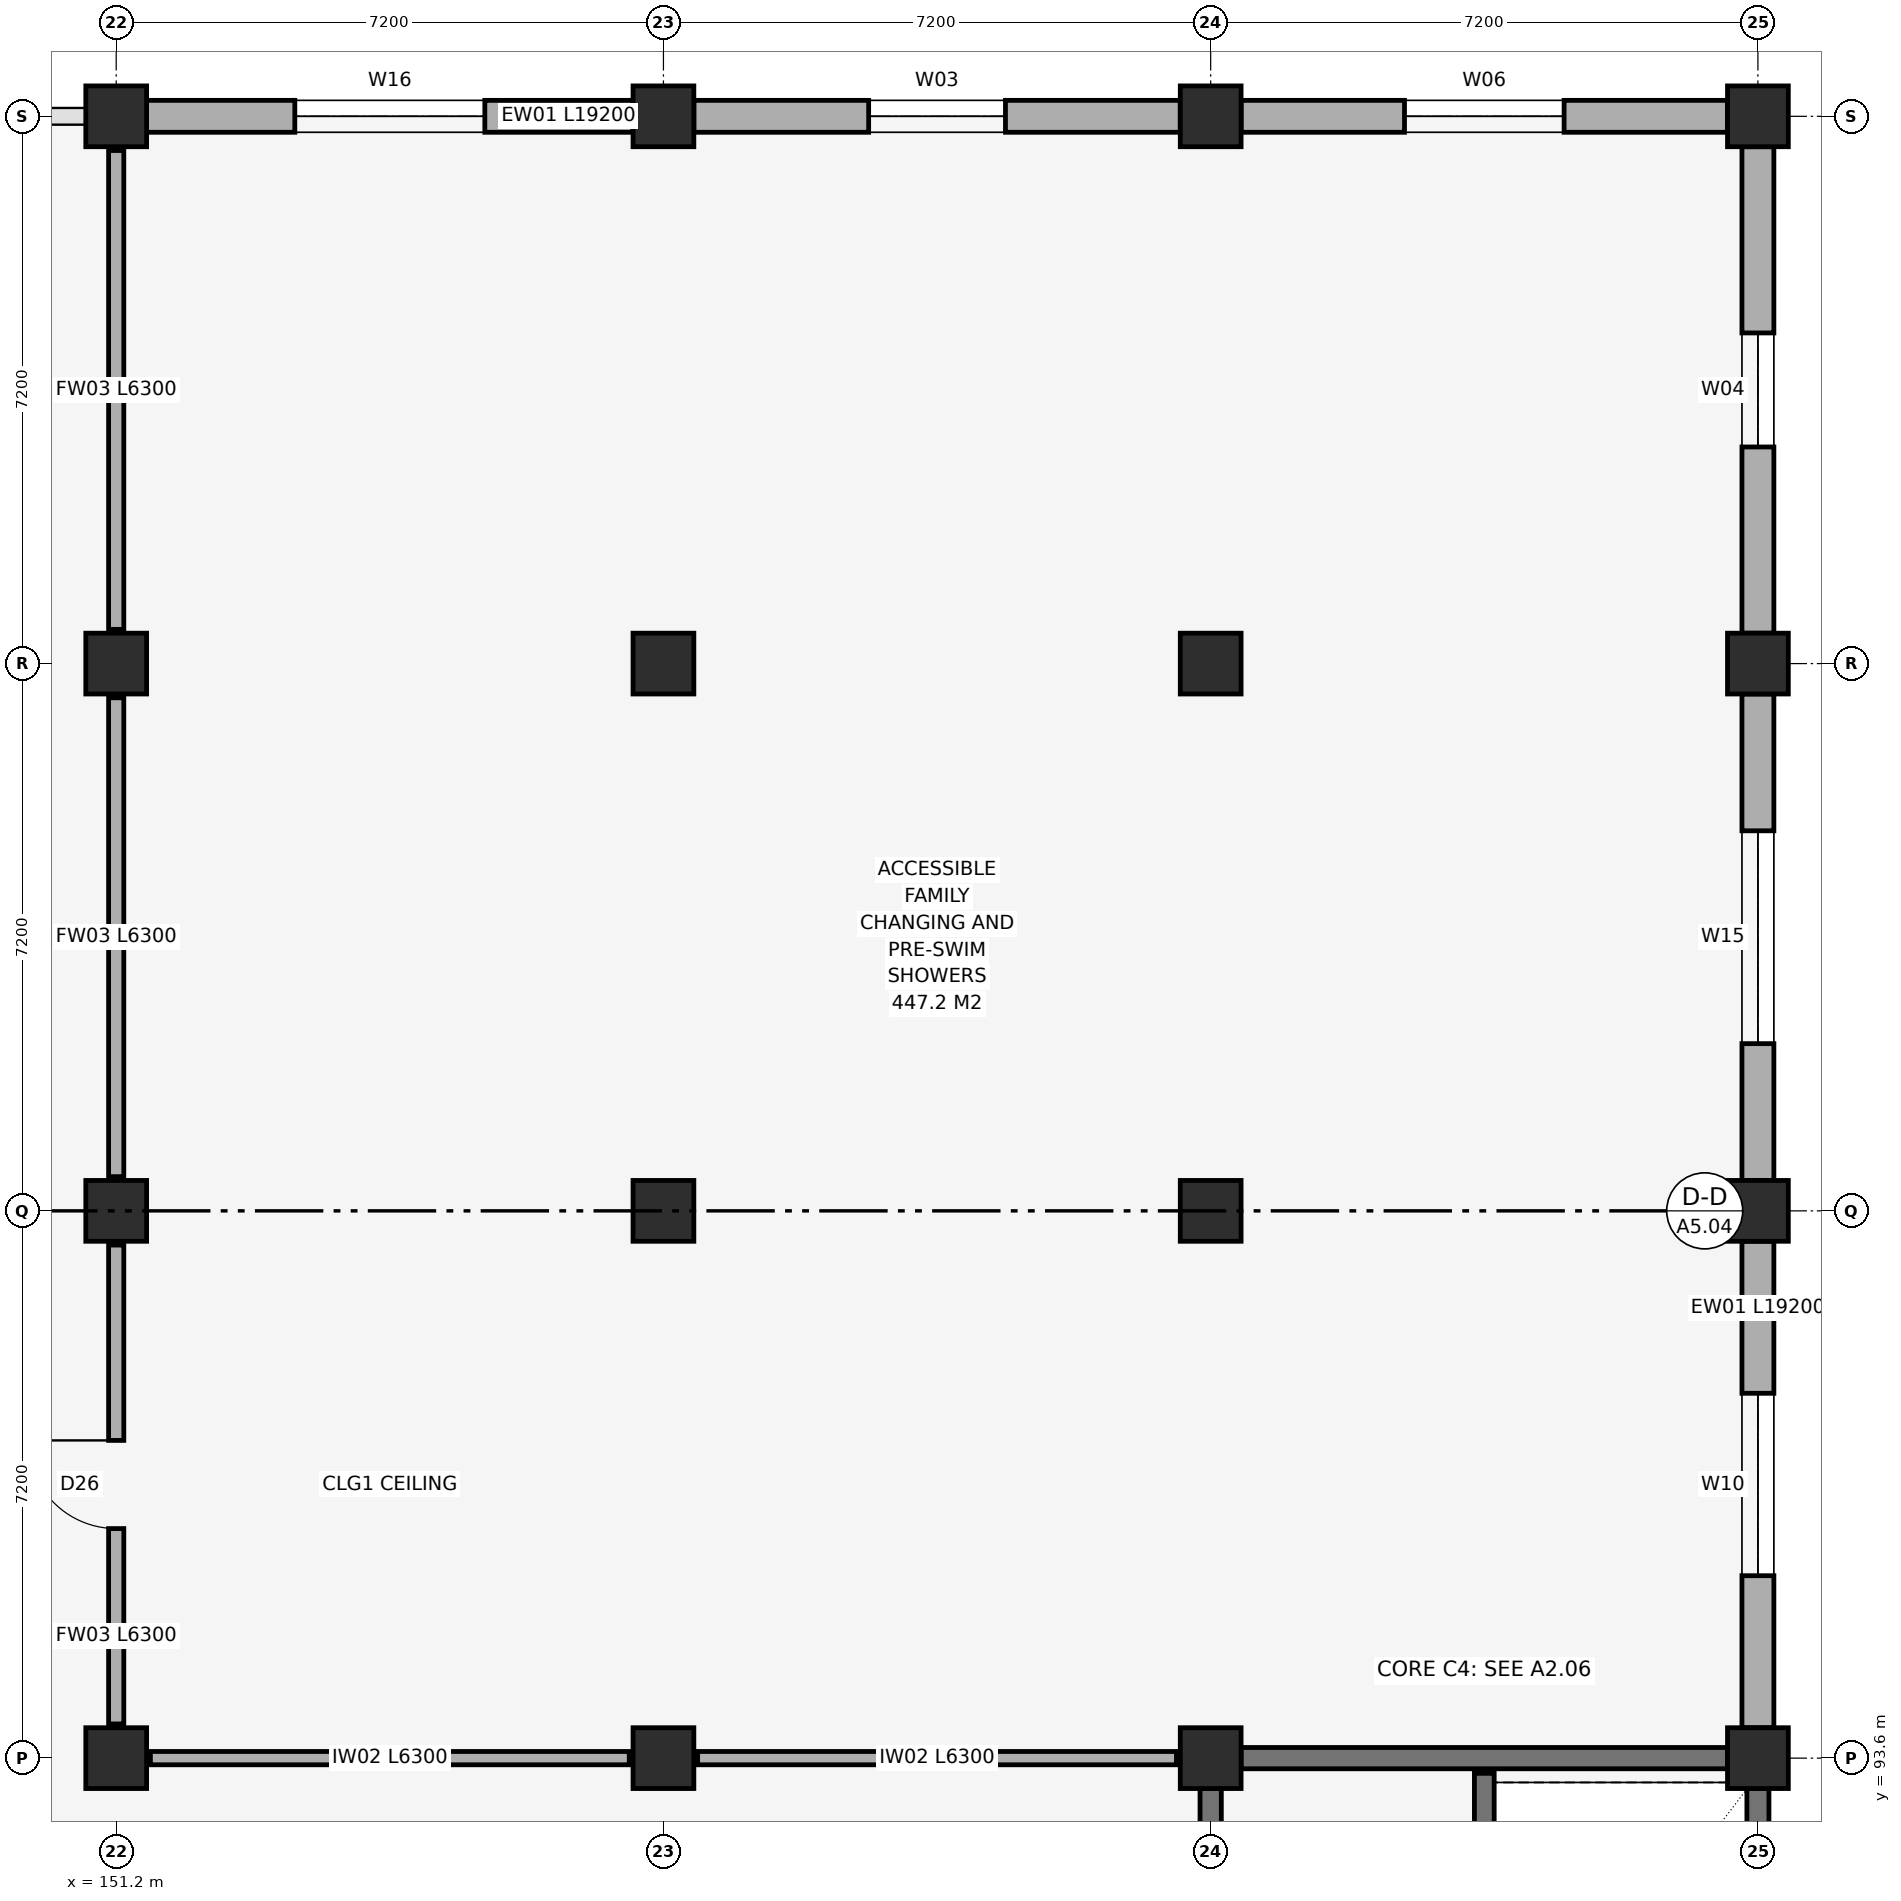
"""IFC4 building model, lengths in metres.
Left out: names, types, materials, properties, quantities, classifications, styles, units other than length and angle.
Written with IfcOpenShell. Run it as: python <this file> out.ifc"""

import sys

from ifc_helpers import new_model, si_unit, direction, frame, frame_2d, origin, origin_2d, place, context, subcontext, project, spatial, rectangle, extrude, element, fill, save


model = new_model("IFC4")
c1 = context("Model", 3, precision=1e-05, world=origin(), true_north=direction((0.0, 1.0)))
c2 = subcontext(c1, "Body", "Model", "MODEL_VIEW")
j1 = project(units=[si_unit("LENGTHUNIT", "METRE"), si_unit("PLANEANGLEUNIT", "RADIAN")], contexts=[c1])
p1 = place(None, origin())
s1 = spatial("IfcSite", under=j1, at=p1, CompositionType="ELEMENT")
p2 = place(p1, origin())
s2 = spatial("IfcBuilding", under=s1, at=p2, CompositionType="ELEMENT")
p3 = place(p2, origin())
s3 = spatial("IfcBuildingStorey", under=s2, at=p3, CompositionType="ELEMENT", Elevation=0.0)
for number, where, z_axis, x_axis in (
    (1, (151.2, 93.6, 0.0), (0.0, 0.0, 1.0), (1.0, 0.0, 0.0)),
    (2, (151.2, 100.8, 0.0), (0.0, 0.0, 1.0), (1.0, 0.0, 0.0)),
    (3, (151.2, 108.0, 0.0), (0.0, 0.0, 1.0), (1.0, 0.0, 0.0)),
    (4, (151.2, 115.2, 0.0), (0.0, 0.0, 1.0), (1.0, 0.0, 0.0)),
    (5, (158.4, 93.6, 0.0), (0.0, 0.0, 1.0), (1.0, 0.0, 0.0)),
    (6, (158.4, 100.8, 0.0), (0.0, 0.0, 1.0), (1.0, 0.0, 0.0)),
    (7, (158.4, 108.0, 0.0), (0.0, 0.0, 1.0), (1.0, 0.0, 0.0)),
    (8, (158.4, 115.2, 0.0), (0.0, 0.0, 1.0), (1.0, 0.0, 0.0)),
    (9, (165.6, 93.6, 0.0), (0.0, 0.0, 1.0), (1.0, 0.0, 0.0)),
    (10, (165.6, 100.8, 0.0), (0.0, 0.0, 1.0), (1.0, 0.0, 0.0)),
    (11, (165.6, 108.0, 0.0), (0.0, 0.0, 1.0), (1.0, 0.0, 0.0)),
    (12, (165.6, 115.2, 0.0), (0.0, 0.0, 1.0), (1.0, 0.0, 0.0)),
    (13, (172.8, 93.6, 0.0), (0.0, 0.0, 1.0), (1.0, 0.0, 0.0)),
    (14, (172.8, 100.8, 0.0), (0.0, 0.0, 1.0), (1.0, 0.0, 0.0)),
    (15, (172.8, 108.0, 0.0), (0.0, 0.0, 1.0), (1.0, 0.0, 0.0)),
    (16, (172.8, 115.2, 0.0), (0.0, 0.0, 1.0), (1.0, 0.0, 0.0)),
):
    element("IfcColumn", number, at=place(p3, frame(where, z_axis=z_axis, x_axis=x_axis)), inside=s3, PredefinedType="COLUMN", context=c2, shape_type="SweptSolid", body=[
        extrude(rectangle(XDim=0.8, YDim=0.8, at=origin_2d()), origin(), (0.0, 0.0, 1.0), 5.4),
    ])
p4 = place(p3, frame((151.6, 115.2, 0.0), z_axis=(0.0, 0.0, 1.0), x_axis=(1.0, 0.0, 0.0)))
e17 = element("IfcWall", 17, at=p4, inside=s3, PredefinedType="SOLIDWALL", context=c2, shape_type="SweptSolid", body=[
    extrude(rectangle(XDim=6.4, YDim=0.42, at=frame_2d((3.2, 0.0))), origin(), (0.0, 0.0, 1.0), 4.495),
])
p5 = place(p4, frame((1.95, 0.0, 0.95)))
e18 = element("IfcOpeningElement", 18, at=p5, cuts=e17, PredefinedType="OPENING", context=c2, shape_type="SweptSolid", body=[
    extrude(rectangle(XDim=2.5, YDim=1.35, at=frame_2d((1.25, 0.675))), frame((0.0, 0.225, 0.0), z_axis=(0.0, -1.0, 0.0), x_axis=(1.0, 0.0, 0.0)), (0.0, 0.0, 1.0), 0.45),
])
p6 = place(p3, frame((158.8, 115.2, 0.0), z_axis=(0.0, 0.0, 1.0), x_axis=(1.0, 0.0, 0.0)))
e19 = element("IfcWall", 19, at=p6, inside=s3, PredefinedType="SOLIDWALL", context=c2, shape_type="SweptSolid", body=[
    extrude(rectangle(XDim=6.4, YDim=0.42, at=frame_2d((3.2, 0.0))), origin(), (0.0, 0.0, 1.0), 4.495),
])
p7 = place(p6, frame((2.3, 0.0, 0.95)))
e20 = element("IfcOpeningElement", 20, at=p7, cuts=e19, PredefinedType="OPENING", context=c2, shape_type="SweptSolid", body=[
    extrude(rectangle(XDim=1.8, YDim=2.2, at=frame_2d((0.9, 1.1))), frame((0.0, 0.225, 0.0), z_axis=(0.0, -1.0, 0.0), x_axis=(1.0, 0.0, 0.0)), (0.0, 0.0, 1.0), 0.45),
])
p8 = place(p3, frame((166.0, 115.2, 0.0), z_axis=(0.0, 0.0, 1.0), x_axis=(1.0, 0.0, 0.0)))
e21 = element("IfcWall", 21, at=p8, inside=s3, PredefinedType="SOLIDWALL", context=c2, shape_type="SweptSolid", body=[
    extrude(rectangle(XDim=6.4, YDim=0.42, at=frame_2d((3.2, 0.0))), origin(), (0.0, 0.0, 1.0), 4.495),
])
p9 = place(p8, frame((2.15, 0.0, 0.95)))
e22 = element("IfcOpeningElement", 22, at=p9, cuts=e21, PredefinedType="OPENING", context=c2, shape_type="SweptSolid", body=[
    extrude(rectangle(XDim=2.1, YDim=2.0, at=frame_2d((1.05, 1.0))), frame((0.0, 0.225, 0.0), z_axis=(0.0, -1.0, 0.0), x_axis=(1.0, 0.0, 0.0)), (0.0, 0.0, 1.0), 0.45),
])
p10 = place(p3, frame((172.8, 94.0, 0.0), z_axis=(0.0, 0.0, 1.0), x_axis=(0.0, 1.0, 0.0)))
e23 = element("IfcWall", 23, at=p10, inside=s3, PredefinedType="SOLIDWALL", context=c2, shape_type="SweptSolid", body=[
    extrude(rectangle(XDim=6.4, YDim=0.42, at=frame_2d((3.2, 0.0))), origin(), (0.0, 0.0, 1.0), 4.495),
])
p11 = place(p10, frame((2.0, 0.0, 0.95)))
e24 = element("IfcOpeningElement", 24, at=p11, cuts=e23, PredefinedType="OPENING", context=c2, shape_type="SweptSolid", body=[
    extrude(rectangle(XDim=2.4, YDim=1.75, at=frame_2d((1.2, 0.875))), frame((0.0, 0.225, 0.0), z_axis=(0.0, -1.0, 0.0), x_axis=(1.0, 0.0, 0.0)), (0.0, 0.0, 1.0), 0.45),
])
p12 = place(p3, frame((172.8, 101.2, 0.0), z_axis=(0.0, 0.0, 1.0), x_axis=(0.0, 1.0, 0.0)))
e25 = element("IfcWall", 25, at=p12, inside=s3, PredefinedType="SOLIDWALL", context=c2, shape_type="SweptSolid", body=[
    extrude(rectangle(XDim=6.4, YDim=0.42, at=frame_2d((3.2, 0.0))), origin(), (0.0, 0.0, 1.0), 4.495),
])
p13 = place(p12, frame((1.8, 0.0, 0.95)))
e26 = element("IfcOpeningElement", 26, at=p13, cuts=e25, PredefinedType="OPENING", context=c2, shape_type="SweptSolid", body=[
    extrude(rectangle(XDim=2.8, YDim=1.5, at=frame_2d((1.4, 0.75))), frame((0.0, 0.225, 0.0), z_axis=(0.0, -1.0, 0.0), x_axis=(1.0, 0.0, 0.0)), (0.0, 0.0, 1.0), 0.45),
])
p14 = place(p3, frame((172.8, 108.4, 0.0), z_axis=(0.0, 0.0, 1.0), x_axis=(0.0, 1.0, 0.0)))
e27 = element("IfcWall", 27, at=p14, inside=s3, PredefinedType="SOLIDWALL", context=c2, shape_type="SweptSolid", body=[
    extrude(rectangle(XDim=6.4, YDim=0.42, at=frame_2d((3.2, 0.0))), origin(), (0.0, 0.0, 1.0), 4.495),
])
p15 = place(p14, frame((2.45, 0.0, 0.95)))
e28 = element("IfcOpeningElement", 28, at=p15, cuts=e27, PredefinedType="OPENING", context=c2, shape_type="SweptSolid", body=[
    extrude(rectangle(XDim=1.5, YDim=2.2, at=frame_2d((0.75, 1.1))), frame((0.0, 0.225, 0.0), z_axis=(0.0, -1.0, 0.0), x_axis=(1.0, 0.0, 0.0)), (0.0, 0.0, 1.0), 0.45),
])
p16 = place(p3, frame((166.0, 93.6, 0.0), z_axis=(0.0, 0.0, 1.0), x_axis=(1.0, 0.0, 0.0)))
e29 = element("IfcWall", 29, at=p16, inside=s3, PredefinedType="SHEAR", context=c2, shape_type="SweptSolid", body=[
    extrude(rectangle(XDim=6.4, YDim=0.28, at=frame_2d((3.2, 0.0))), origin(), (0.0, 0.0, 1.0), 5.14),
])
p17 = place(p3, frame((165.6, 86.8, 0.0), z_axis=(0.0, 0.0, 1.0), x_axis=(0.0, 1.0, 0.0)))
e30 = element("IfcWall", 30, at=p17, inside=s3, PredefinedType="SHEAR", context=c2, shape_type="SweptSolid", body=[
    extrude(rectangle(XDim=6.4, YDim=0.28, at=frame_2d((3.2, 0.0))), origin(), (0.0, 0.0, 1.0), 5.14),
])
p18 = place(p17, frame((2.4, 0.0, 0.0)))
e31 = element("IfcOpeningElement", 31, at=p18, cuts=e30, PredefinedType="OPENING", context=c2, shape_type="SweptSolid", body=[
    extrude(rectangle(XDim=1.6, YDim=2.2, at=frame_2d((0.8, 1.1))), frame((0.0, 0.155, 0.0), z_axis=(0.0, -1.0, 0.0), x_axis=(1.0, 0.0, 0.0)), (0.0, 0.0, 1.0), 0.31),
])
p19 = place(p3, frame((172.8, 86.8, 0.0), z_axis=(0.0, 0.0, 1.0), x_axis=(0.0, 1.0, 0.0)))
e32 = element("IfcWall", 32, at=p19, inside=s3, PredefinedType="SHEAR", context=c2, shape_type="SweptSolid", body=[
    extrude(rectangle(XDim=6.4, YDim=0.29, at=frame_2d((3.2, 0.0))), origin(), (0.0, 0.0, 1.0), 5.14),
])
p20 = place(p3, frame((169.2, 79.4, 0.0), z_axis=(0.0, 0.0, 1.0), x_axis=(0.0, 1.0, 0.0)))
e33 = element("IfcWall", 33, at=p20, inside=s3, PredefinedType="SHEAR", context=c2, shape_type="SweptSolid", body=[
    extrude(rectangle(XDim=14.0, YDim=0.26, at=frame_2d((7.0, 0.0))), origin(), (0.0, 0.0, 1.0), 5.14),
])
p21 = place(p20, frame((1.65, 0.0, 0.0)))
e34 = element("IfcOpeningElement", 34, at=p21, cuts=e33, PredefinedType="OPENING", context=c2, shape_type="SweptSolid", body=[
    extrude(rectangle(XDim=1.1, YDim=2.15, at=frame_2d((0.55, 1.075))), frame((0.0, 0.145, 0.0), z_axis=(0.0, -1.0, 0.0), x_axis=(1.0, 0.0, 0.0)), (0.0, 0.0, 1.0), 0.29),
])
p22 = place(p20, frame((10.6, 0.0, 0.0)))
e35 = element("IfcOpeningElement", 35, at=p22, cuts=e33, PredefinedType="OPENING", context=c2, shape_type="SweptSolid", body=[
    extrude(rectangle(XDim=1.15, YDim=2.2, at=frame_2d((0.575, 1.1))), frame((0.0, 0.145, 0.0), z_axis=(0.0, -1.0, 0.0), x_axis=(1.0, 0.0, 0.0)), (0.0, 0.0, 1.0), 0.29),
])
p23 = place(p3, frame((151.65, 93.6, 0.0), z_axis=(0.0, 0.0, 1.0), x_axis=(1.0, 0.0, 0.0)))
e36 = element("IfcWall", 36, at=p23, inside=s3, PredefinedType="PARTITIONING", context=c2, shape_type="SweptSolid", body=[
    extrude(rectangle(XDim=6.3, YDim=0.175, at=frame_2d((3.15, 0.0))), origin(), (0.0, 0.0, 1.0), 4.64),
])
p24 = place(p3, frame((158.85, 93.6, 0.0), z_axis=(0.0, 0.0, 1.0), x_axis=(1.0, 0.0, 0.0)))
e37 = element("IfcWall", 37, at=p24, inside=s3, PredefinedType="PARTITIONING", context=c2, shape_type="SweptSolid", body=[
    extrude(rectangle(XDim=6.3, YDim=0.175, at=frame_2d((3.15, 0.0))), origin(), (0.0, 0.0, 1.0), 4.64),
])
p25 = place(p3, frame((151.2, 94.05, 0.0), z_axis=(0.0, 0.0, 1.0), x_axis=(0.0, 1.0, 0.0)))
e38 = element("IfcWall", 38, at=p25, inside=s3, PredefinedType="SOLIDWALL", context=c2, shape_type="SweptSolid", body=[
    extrude(rectangle(XDim=6.3, YDim=0.2, at=frame_2d((3.15, 0.0))), origin(), (0.0, 0.0, 1.0), 4.495),
])
p26 = place(p25, frame((2.57, 0.0, 0.0)))
e39 = element("IfcOpeningElement", 39, at=p26, cuts=e38, PredefinedType="OPENING", context=c2, shape_type="SweptSolid", body=[
    extrude(rectangle(XDim=1.16, YDim=2.2, at=frame_2d((0.58, 1.1))), frame((0.0, 0.115, 0.0), z_axis=(0.0, -1.0, 0.0), x_axis=(1.0, 0.0, 0.0)), (0.0, 0.0, 1.0), 0.23),
])
for number, where, z_axis, x_axis in (
    (40, (151.2, 101.25, 0.0), (0.0, 0.0, 1.0), (0.0, 1.0, 0.0)),
    (41, (151.2, 108.45, 0.0), (0.0, 0.0, 1.0), (0.0, 1.0, 0.0)),
):
    element("IfcWall", number, at=place(p3, frame(where, z_axis=z_axis, x_axis=x_axis)), inside=s3, PredefinedType="SOLIDWALL", context=c2, shape_type="SweptSolid", body=[
        extrude(rectangle(XDim=6.3, YDim=0.2, at=frame_2d((3.15, 0.0))), origin(), (0.0, 0.0, 1.0), 4.495),
    ])
p27 = place(p5, origin())
e42 = element("IfcWindow", 42, at=p27, inside=s3, PartitioningType="SINGLE_PANEL", PredefinedType="WINDOW", context=c2, shape_type="SweptSolid", body=[
    extrude(rectangle(XDim=2.5, YDim=1.35, at=frame_2d((1.25, 0.675))), frame((0.0, 0.03, 0.0), z_axis=(0.0, -1.0, 0.0), x_axis=(1.0, 0.0, 0.0)), (0.0, 0.0, 1.0), 0.06),
])
fill(e18, e42)
p28 = place(p7, origin())
e43 = element("IfcWindow", 43, at=p28, inside=s3, PartitioningType="SINGLE_PANEL", PredefinedType="WINDOW", context=c2, shape_type="SweptSolid", body=[
    extrude(rectangle(XDim=1.8, YDim=2.2, at=frame_2d((0.9, 1.1))), frame((0.0, 0.03, 0.0), z_axis=(0.0, -1.0, 0.0), x_axis=(1.0, 0.0, 0.0)), (0.0, 0.0, 1.0), 0.06),
])
fill(e20, e43)
p29 = place(p9, origin())
e44 = element("IfcWindow", 44, at=p29, inside=s3, PartitioningType="SINGLE_PANEL", PredefinedType="WINDOW", context=c2, shape_type="SweptSolid", body=[
    extrude(rectangle(XDim=2.1, YDim=2.0, at=frame_2d((1.05, 1.0))), frame((0.0, 0.03, 0.0), z_axis=(0.0, -1.0, 0.0), x_axis=(1.0, 0.0, 0.0)), (0.0, 0.0, 1.0), 0.06),
])
fill(e22, e44)
p30 = place(p11, origin())
e45 = element("IfcWindow", 45, at=p30, inside=s3, PartitioningType="SINGLE_PANEL", PredefinedType="WINDOW", context=c2, shape_type="SweptSolid", body=[
    extrude(rectangle(XDim=2.4, YDim=1.75, at=frame_2d((1.2, 0.875))), frame((0.0, 0.03, 0.0), z_axis=(0.0, -1.0, 0.0), x_axis=(1.0, 0.0, 0.0)), (0.0, 0.0, 1.0), 0.06),
])
fill(e24, e45)
p31 = place(p13, origin())
e46 = element("IfcWindow", 46, at=p31, inside=s3, PartitioningType="SINGLE_PANEL", PredefinedType="WINDOW", context=c2, shape_type="SweptSolid", body=[
    extrude(rectangle(XDim=2.8, YDim=1.5, at=frame_2d((1.4, 0.75))), frame((0.0, 0.03, 0.0), z_axis=(0.0, -1.0, 0.0), x_axis=(1.0, 0.0, 0.0)), (0.0, 0.0, 1.0), 0.06),
])
fill(e26, e46)
p32 = place(p15, origin())
e47 = element("IfcWindow", 47, at=p32, inside=s3, PartitioningType="SINGLE_PANEL", PredefinedType="WINDOW", context=c2, shape_type="SweptSolid", body=[
    extrude(rectangle(XDim=1.5, YDim=2.2, at=frame_2d((0.75, 1.1))), frame((0.0, 0.03, 0.0), z_axis=(0.0, -1.0, 0.0), x_axis=(1.0, 0.0, 0.0)), (0.0, 0.0, 1.0), 0.06),
])
fill(e28, e47)
p33 = place(p26, frame((1.16, 0.0, 0.0), z_axis=(0.0, 0.0, 1.0), x_axis=(-1.0, 0.0, 0.0)))
e48 = element("IfcDoor", 48, at=p33, inside=s3, OperationType="SINGLE_SWING_LEFT", PredefinedType="DOOR", context=c2, shape_type="SweptSolid", body=[
    extrude(rectangle(XDim=1.16, YDim=2.2, at=frame_2d((0.58, 1.1))), frame((0.0, 0.025, 0.0), z_axis=(0.0, -1.0, 0.0), x_axis=(1.0, 0.0, 0.0)), (0.0, 0.0, 1.0), 0.05),
])
fill(e39, e48)
save(model, sys.argv[1])
